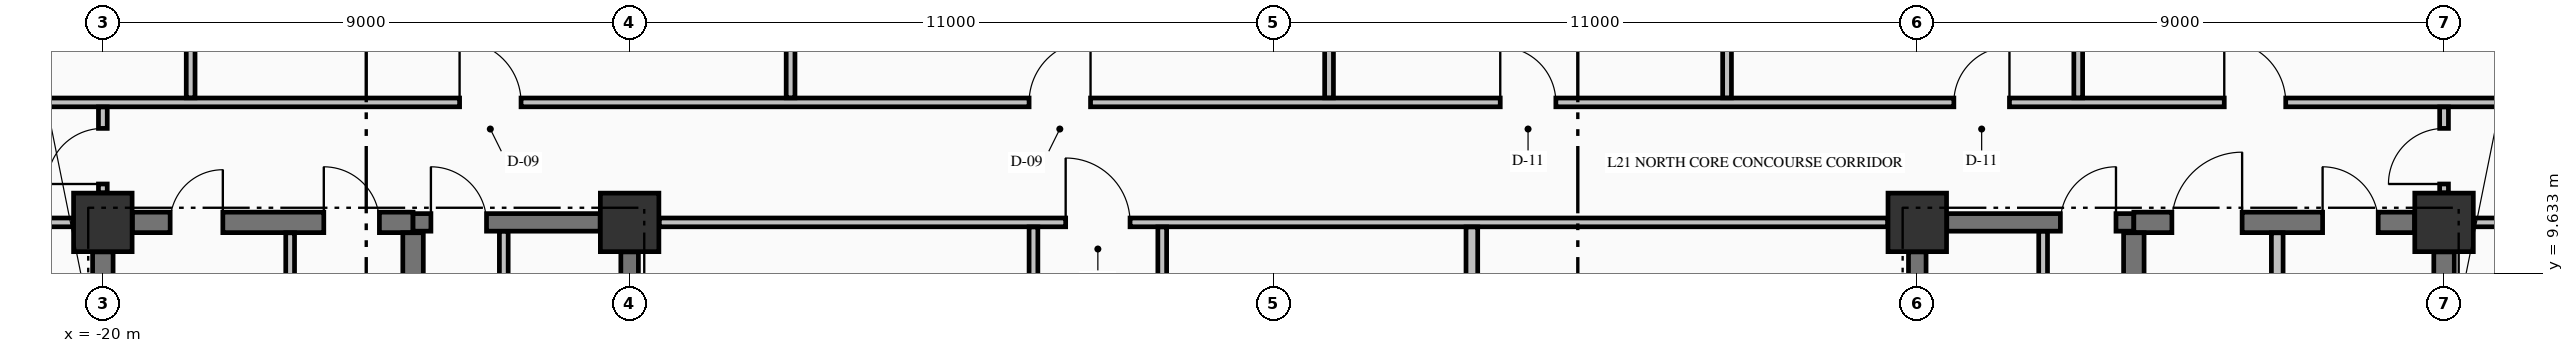
"""IFC4 building model, lengths in metres.
Left out: names, types, materials, properties, quantities, classifications, styles, units other than length and angle.
Written with IfcOpenShell. Run it as: python <this file> out.ifc"""

import sys

from ifc_helpers import new_model, si_unit, direction, frame, frame_2d, origin, origin_2d, place, context, subcontext, project, spatial, rectangle, extrude, element, fill, save


model = new_model("IFC4")
c1 = context("Model", 3, precision=1e-05, world=origin(), true_north=direction((0.0, 1.0)))
c2 = subcontext(c1, "Body", "Model", "MODEL_VIEW")
j1 = project(units=[si_unit("LENGTHUNIT", "METRE"), si_unit("PLANEANGLEUNIT", "RADIAN")], contexts=[c1])
p1 = place(None, origin())
s1 = spatial("IfcSite", under=j1, at=p1, CompositionType="ELEMENT")
p2 = place(p1, origin())
s2 = spatial("IfcBuilding", under=s1, at=p2, CompositionType="ELEMENT")
p3 = place(p2, frame((0.0, 0.0, 86.94)))
s3 = spatial("IfcBuildingStorey", under=s2, at=p3, CompositionType="ELEMENT", Elevation=86.94)
for number, where, z_axis, x_axis in (
    (1, (-20.0, 10.5, -0.425), (0.0, 0.0, 1.0), (1.0, 0.0, 0.0)),
    (2, (-11.0, 10.5, -0.425), (0.0, 0.0, 1.0), (1.0, 0.0, 0.0)),
    (3, (11.0, 10.5, -0.425), (0.0, 0.0, 1.0), (1.0, 0.0, 0.0)),
    (4, (20.0, 10.5, -0.425), (0.0, 0.0, 1.0), (1.0, 0.0, 0.0)),
):
    element("IfcColumn", number, at=place(p3, frame(where, z_axis=z_axis, x_axis=x_axis)), inside=s3, PredefinedType="COLUMN", context=c2, shape_type="SweptSolid", body=[
        extrude(rectangle(XDim=1.0, YDim=1.0, at=origin_2d()), origin(), (0.0, 0.0, 1.0), 4.595),
    ])
p4 = place(p3, frame((-19.496, 10.5, 0.0), z_axis=(0.0, 0.0, 1.0), x_axis=(1.0, 0.0, 0.0)))
e5 = element("IfcWall", 5, at=p4, inside=s3, PredefinedType="SHEAR", context=c2, shape_type="SweptSolid", body=[
    extrude(rectangle(XDim=4.796, YDim=0.35, at=frame_2d((2.398, 0.0))), origin(), (0.0, 0.0, 1.0), 4.17),
])
p5 = place(p4, frame((0.646, 0.0, 0.0)))
e6 = element("IfcOpeningElement", 6, at=p5, cuts=e5, PredefinedType="OPENING", context=c2, shape_type="SweptSolid", body=[
    extrude(rectangle(XDim=0.9, YDim=2.15, at=frame_2d((0.45, 1.075))), frame((0.0, 0.185, 0.0), z_axis=(0.0, -1.0, 0.0), x_axis=(1.0, 0.0, 0.0)), (0.0, 0.0, 1.0), 0.37),
])
p6 = place(p4, frame((3.271, 0.0, 0.0)))
e7 = element("IfcOpeningElement", 7, at=p6, cuts=e5, PredefinedType="OPENING", context=c2, shape_type="SweptSolid", body=[
    extrude(rectangle(XDim=0.95, YDim=2.15, at=frame_2d((0.475, 1.075))), frame((0.0, 0.185, 0.0), z_axis=(0.0, -1.0, 0.0), x_axis=(1.0, 0.0, 0.0)), (0.0, 0.0, 1.0), 0.37),
])
p7 = place(p3, frame((-14.7, 10.5, 0.0), z_axis=(0.0, 0.0, 1.0), x_axis=(1.0, 0.0, 0.0)))
e8 = element("IfcWall", 8, at=p7, inside=s3, PredefinedType="SHEAR", context=c2, shape_type="SweptSolid", body=[
    extrude(rectangle(XDim=3.196, YDim=0.3, at=frame_2d((1.598, 0.0))), origin(), (0.0, 0.0, 1.0), 4.17),
])
p8 = place(p7, frame((0.305, 0.0, 0.0)))
e9 = element("IfcOpeningElement", 9, at=p8, cuts=e8, PredefinedType="OPENING", context=c2, shape_type="SweptSolid", body=[
    extrude(rectangle(XDim=0.95, YDim=2.15, at=frame_2d((0.475, 1.075))), frame((0.0, 0.16, 0.0), z_axis=(0.0, -1.0, 0.0), x_axis=(1.0, 0.0, 0.0)), (0.0, 0.0, 1.0), 0.32),
])
p9 = place(p3, frame((11.504, 10.5, 0.0), z_axis=(0.0, 0.0, 1.0), x_axis=(1.0, 0.0, 0.0)))
e10 = element("IfcWall", 10, at=p9, inside=s3, PredefinedType="SHEAR", context=c2, shape_type="SweptSolid", body=[
    extrude(rectangle(XDim=3.196, YDim=0.3, at=frame_2d((1.598, 0.0))), origin(), (0.0, 0.0, 1.0), 4.17),
])
p10 = place(p9, frame((1.941, 0.0, 0.0)))
e11 = element("IfcOpeningElement", 11, at=p10, cuts=e10, PredefinedType="OPENING", context=c2, shape_type="SweptSolid", body=[
    extrude(rectangle(XDim=0.95, YDim=2.15, at=frame_2d((0.475, 1.075))), frame((0.0, 0.16, 0.0), z_axis=(0.0, -1.0, 0.0), x_axis=(1.0, 0.0, 0.0)), (0.0, 0.0, 1.0), 0.32),
])
p11 = place(p3, frame((14.7, 10.5, 0.0), z_axis=(0.0, 0.0, 1.0), x_axis=(1.0, 0.0, 0.0)))
e12 = element("IfcWall", 12, at=p11, inside=s3, PredefinedType="SHEAR", context=c2, shape_type="SweptSolid", body=[
    extrude(rectangle(XDim=4.796, YDim=0.35, at=frame_2d((2.398, 0.0))), origin(), (0.0, 0.0, 1.0), 4.17),
])
p12 = place(p11, frame((0.65, 0.0, 0.0)))
e13 = element("IfcOpeningElement", 13, at=p12, cuts=e12, PredefinedType="OPENING", context=c2, shape_type="SweptSolid", body=[
    extrude(rectangle(XDim=1.2, YDim=2.15, at=frame_2d((0.6, 1.075))), frame((0.0, 0.185, 0.0), z_axis=(0.0, -1.0, 0.0), x_axis=(1.0, 0.0, 0.0)), (0.0, 0.0, 1.0), 0.37),
])
p13 = place(p11, frame((3.225, 0.0, 0.0)))
e14 = element("IfcOpeningElement", 14, at=p13, cuts=e12, PredefinedType="OPENING", context=c2, shape_type="SweptSolid", body=[
    extrude(rectangle(XDim=0.95, YDim=2.15, at=frame_2d((0.475, 1.075))), frame((0.0, 0.185, 0.0), z_axis=(0.0, -1.0, 0.0), x_axis=(1.0, 0.0, 0.0)), (0.0, 0.0, 1.0), 0.37),
])
p14 = place(p3, frame((-22.835, 10.5, 0.0), z_axis=(0.0, 0.0, 1.0), x_axis=(1.0, 0.0, 0.0)))
e15 = element("IfcWall", 15, at=p14, inside=s3, PredefinedType="PARTITIONING", context=c2, shape_type="SweptSolid", body=[
    extrude(rectangle(XDim=2.329, YDim=0.15, at=frame_2d((1.165, 0.0))), origin(), (0.0, 0.0, 1.0), 4.17),
])
p15 = place(p14, frame((0.835, 0.0, 0.0)))
e16 = element("IfcOpeningElement", 16, at=p15, cuts=e15, PredefinedType="OPENING", context=c2, shape_type="SweptSolid", body=[
    extrude(rectangle(XDim=1.0, YDim=2.15, at=frame_2d((0.5, 1.075))), frame((0.0, 0.085, 0.0), z_axis=(0.0, -1.0, 0.0), x_axis=(1.0, 0.0, 0.0)), (0.0, 0.0, 1.0), 0.17),
])
p16 = place(p3, frame((-10.494, 10.5, 0.0), z_axis=(0.0, 0.0, 1.0), x_axis=(1.0, 0.0, 0.0)))
e17 = element("IfcWall", 17, at=p16, inside=s3, PredefinedType="PARTITIONING", context=c2, shape_type="SweptSolid", body=[
    extrude(rectangle(XDim=20.988, YDim=0.15, at=frame_2d((10.494, 0.0))), origin(), (0.0, 0.0, 1.0), 4.17),
])
p17 = place(p16, frame((6.944, 0.0, 0.0)))
e18 = element("IfcOpeningElement", 18, at=p17, cuts=e17, PredefinedType="OPENING", context=c2, shape_type="SweptSolid", body=[
    extrude(rectangle(XDim=1.1, YDim=2.15, at=frame_2d((0.55, 1.075))), frame((0.0, 0.085, 0.0), z_axis=(0.0, -1.0, 0.0), x_axis=(1.0, 0.0, 0.0)), (0.0, 0.0, 1.0), 0.17),
])
p18 = place(p3, frame((20.506, 10.5, 0.0), z_axis=(0.0, 0.0, 1.0), x_axis=(1.0, 0.0, 0.0)))
e19 = element("IfcWall", 19, at=p18, inside=s3, PredefinedType="PARTITIONING", context=c2, shape_type="SweptSolid", body=[
    extrude(rectangle(XDim=7.329, YDim=0.15, at=frame_2d((3.665, 0.0))), origin(), (0.0, 0.0, 1.0), 4.17),
])
p19 = place(p18, frame((3.019, 0.0, 0.0)))
e20 = element("IfcOpeningElement", 20, at=p19, cuts=e19, PredefinedType="OPENING", context=c2, shape_type="SweptSolid", body=[
    extrude(rectangle(XDim=0.95, YDim=2.15, at=frame_2d((0.475, 1.075))), frame((0.0, 0.085, 0.0), z_axis=(0.0, -1.0, 0.0), x_axis=(1.0, 0.0, 0.0)), (0.0, 0.0, 1.0), 0.17),
])
p20 = place(p3, frame((-22.835, 12.55, 0.0), z_axis=(0.0, 0.0, 1.0), x_axis=(1.0, 0.0, 0.0)))
e21 = element("IfcWall", 21, at=p20, inside=s3, PredefinedType="PARTITIONING", context=c2, shape_type="SweptSolid", body=[
    extrude(rectangle(XDim=50.67, YDim=0.15, at=frame_2d((25.335, 0.0))), origin(), (0.0, 0.0, 1.0), 4.17),
])
p21 = place(p20, frame((8.93, 0.0, 0.0)))
e22 = element("IfcOpeningElement", 22, at=p21, cuts=e21, PredefinedType="OPENING", context=c2, shape_type="SweptSolid", body=[
    extrude(rectangle(XDim=1.05, YDim=2.15, at=frame_2d((0.525, 1.075))), frame((0.0, 0.085, 0.0), z_axis=(0.0, -1.0, 0.0), x_axis=(1.0, 0.0, 0.0)), (0.0, 0.0, 1.0), 0.17),
])
p22 = place(p20, frame((18.66, 0.0, 0.0)))
e23 = element("IfcOpeningElement", 23, at=p22, cuts=e21, PredefinedType="OPENING", context=c2, shape_type="SweptSolid", body=[
    extrude(rectangle(XDim=1.05, YDim=2.15, at=frame_2d((0.525, 1.075))), frame((0.0, 0.085, 0.0), z_axis=(0.0, -1.0, 0.0), x_axis=(1.0, 0.0, 0.0)), (0.0, 0.0, 1.0), 0.17),
])
p23 = place(p20, frame((26.71, 0.0, 0.0)))
e24 = element("IfcOpeningElement", 24, at=p23, cuts=e21, PredefinedType="OPENING", context=c2, shape_type="SweptSolid", body=[
    extrude(rectangle(XDim=0.95, YDim=2.15, at=frame_2d((0.475, 1.075))), frame((0.0, 0.085, 0.0), z_axis=(0.0, -1.0, 0.0), x_axis=(1.0, 0.0, 0.0)), (0.0, 0.0, 1.0), 0.17),
])
p24 = place(p20, frame((34.46, 0.0, 0.0)))
e25 = element("IfcOpeningElement", 25, at=p24, cuts=e21, PredefinedType="OPENING", context=c2, shape_type="SweptSolid", body=[
    extrude(rectangle(XDim=0.95, YDim=2.15, at=frame_2d((0.475, 1.075))), frame((0.0, 0.085, 0.0), z_axis=(0.0, -1.0, 0.0), x_axis=(1.0, 0.0, 0.0)), (0.0, 0.0, 1.0), 0.17),
])
p25 = place(p20, frame((39.08, 0.0, 0.0)))
e26 = element("IfcOpeningElement", 26, at=p25, cuts=e21, PredefinedType="OPENING", context=c2, shape_type="SweptSolid", body=[
    extrude(rectangle(XDim=1.05, YDim=2.15, at=frame_2d((0.525, 1.075))), frame((0.0, 0.085, 0.0), z_axis=(0.0, -1.0, 0.0), x_axis=(1.0, 0.0, 0.0)), (0.0, 0.0, 1.0), 0.17),
])
p26 = place(p3, frame((-20.0, 0.504, 0.0), z_axis=(0.0, 0.0, 1.0), x_axis=(0.0, 1.0, 0.0)))
e27 = element("IfcWall", 27, at=p26, inside=s3, PredefinedType="SHEAR", context=c2, shape_type="SweptSolid", body=[
    extrude(rectangle(XDim=9.492, YDim=0.35, at=frame_2d((4.746, 0.0))), origin(), (0.0, 0.0, 1.0), 4.17),
])
p27 = place(p3, frame((-14.7, 5.852, 0.0), z_axis=(0.0, 0.0, 1.0), x_axis=(0.0, 1.0, 0.0)))
e28 = element("IfcWall", 28, at=p27, inside=s3, PredefinedType="SHEAR", context=c2, shape_type="SweptSolid", body=[
    extrude(rectangle(XDim=4.471, YDim=0.35, at=frame_2d((2.235, 0.0))), origin(), (0.0, 0.0, 1.0), 4.17),
])
for number, where, z_axis, x_axis in (
    (29, (-11.0, 5.852, 0.0), (0.0, 0.0, 1.0), (0.0, 1.0, 0.0)),
    (30, (11.0, 5.852, 0.0), (0.0, 0.0, 1.0), (0.0, 1.0, 0.0)),
):
    element("IfcWall", number, at=place(p3, frame(where, z_axis=z_axis, x_axis=x_axis)), inside=s3, PredefinedType="SHEAR", context=c2, shape_type="SweptSolid", body=[
        extrude(rectangle(XDim=4.144, YDim=0.3, at=frame_2d((2.072, 0.0))), origin(), (0.0, 0.0, 1.0), 4.17),
    ])
p28 = place(p3, frame((14.7, 5.852, 0.0), z_axis=(0.0, 0.0, 1.0), x_axis=(0.0, 1.0, 0.0)))
e31 = element("IfcWall", 31, at=p28, inside=s3, PredefinedType="SHEAR", context=c2, shape_type="SweptSolid", body=[
    extrude(rectangle(XDim=4.471, YDim=0.35, at=frame_2d((2.235, 0.0))), origin(), (0.0, 0.0, 1.0), 4.17),
])
p29 = place(p3, frame((20.0, 5.377, 0.0), z_axis=(0.0, 0.0, 1.0), x_axis=(0.0, 1.0, 0.0)))
e32 = element("IfcWall", 32, at=p29, inside=s3, PredefinedType="SHEAR", context=c2, shape_type="SweptSolid", body=[
    extrude(rectangle(XDim=4.619, YDim=0.35, at=frame_2d((2.31, 0.0))), origin(), (0.0, 0.0, 1.0), 4.17),
])
p30 = place(p3, frame((-20.0, 11.006, 0.0), z_axis=(0.0, 0.0, 1.0), x_axis=(0.0, 1.0, 0.0)))
e33 = element("IfcWall", 33, at=p30, inside=s3, PredefinedType="PARTITIONING", context=c2, shape_type="SweptSolid", body=[
    extrude(rectangle(XDim=1.466, YDim=0.15, at=frame_2d((0.733, 0.0))), origin(), (0.0, 0.0, 1.0), 3.36),
])
p31 = place(p30, frame((0.15, 0.0, 0.0)))
e34 = element("IfcOpeningElement", 34, at=p31, cuts=e33, PredefinedType="OPENING", context=c2, shape_type="SweptSolid", body=[
    extrude(rectangle(XDim=0.95, YDim=2.15, at=frame_2d((0.475, 1.075))), frame((0.0, 0.085, 0.0), z_axis=(0.0, -1.0, 0.0), x_axis=(1.0, 0.0, 0.0)), (0.0, 0.0, 1.0), 0.17),
])
p32 = place(p3, frame((-18.5, 12.628, 0.0), z_axis=(0.0, 0.0, 1.0), x_axis=(0.0, 1.0, 0.0)))
e35 = element("IfcWall", 35, at=p32, inside=s3, PredefinedType="PARTITIONING", context=c2, shape_type="SweptSolid", body=[
    extrude(rectangle(XDim=7.766, YDim=0.15, at=frame_2d((3.883, 0.0))), origin(), (0.0, 0.0, 1.0), 4.17),
])
p33 = place(p3, frame((-16.8, 4.878, 0.0), z_axis=(0.0, 0.0, 1.0), x_axis=(0.0, 1.0, 0.0)))
e36 = element("IfcWall", 36, at=p33, inside=s3, PredefinedType="PARTITIONING", context=c2, shape_type="SweptSolid", body=[
    extrude(rectangle(XDim=5.444, YDim=0.15, at=frame_2d((2.722, 0.0))), origin(), (0.0, 0.0, 1.0), 4.17),
])
p34 = place(p3, frame((-13.15, 7.228, 0.0), z_axis=(0.0, 0.0, 1.0), x_axis=(0.0, 1.0, 0.0)))
e37 = element("IfcWall", 37, at=p34, inside=s3, PredefinedType="PARTITIONING", context=c2, shape_type="SweptSolid", body=[
    extrude(rectangle(XDim=3.119, YDim=0.15, at=frame_2d((1.56, 0.0))), origin(), (0.0, 0.0, 1.0), 4.17),
])
p35 = place(p34, frame((1.097, 0.0, 0.0)))
e38 = element("IfcOpeningElement", 38, at=p35, cuts=e37, PredefinedType="OPENING", context=c2, shape_type="SweptSolid", body=[
    extrude(rectangle(XDim=0.95, YDim=2.15, at=frame_2d((0.475, 1.075))), frame((0.0, 0.085, 0.0), z_axis=(0.0, -1.0, 0.0), x_axis=(1.0, 0.0, 0.0)), (0.0, 0.0, 1.0), 0.17),
])
p36 = place(p3, frame((-8.25, 12.628, 0.0), z_axis=(0.0, 0.0, 1.0), x_axis=(0.0, 1.0, 0.0)))
e39 = element("IfcWall", 39, at=p36, inside=s3, PredefinedType="PARTITIONING", context=c2, shape_type="SweptSolid", body=[
    extrude(rectangle(XDim=12.707, YDim=0.15, at=frame_2d((6.354, 0.0))), origin(), (0.0, 0.0, 1.0), 4.17),
])
for number, where, z_axis, x_axis in (
    (40, (-4.1, 2.978, 0.0), (0.0, 0.0, 1.0), (0.0, 1.0, 0.0)),
    (41, (-1.9, 2.978, 0.0), (0.0, 0.0, 1.0), (0.0, 1.0, 0.0)),
):
    element("IfcWall", number, at=place(p3, frame(where, z_axis=z_axis, x_axis=x_axis)), inside=s3, PredefinedType="PARTITIONING", context=c2, shape_type="SweptSolid", body=[
        extrude(rectangle(XDim=7.444, YDim=0.15, at=frame_2d((3.722, 0.0))), origin(), (0.0, 0.0, 1.0), 4.17),
    ])
p37 = place(p3, frame((0.95, 12.628, 0.0), z_axis=(0.0, 0.0, 1.0), x_axis=(0.0, 1.0, 0.0)))
e42 = element("IfcWall", 42, at=p37, inside=s3, PredefinedType="PARTITIONING", context=c2, shape_type="SweptSolid", body=[
    extrude(rectangle(XDim=12.812, YDim=0.15, at=frame_2d((6.406, 0.0))), origin(), (0.0, 0.0, 1.0), 4.17),
])
p38 = place(p3, frame((3.39, 2.978, 0.0), z_axis=(0.0, 0.0, 1.0), x_axis=(0.0, 1.0, 0.0)))
e43 = element("IfcWall", 43, at=p38, inside=s3, PredefinedType="PARTITIONING", context=c2, shape_type="SweptSolid", body=[
    extrude(rectangle(XDim=7.444, YDim=0.2, at=frame_2d((3.722, 0.0))), origin(), (0.0, 0.0, 1.0), 4.17),
])
p39 = place(p3, frame((7.75, 12.628, 0.0), z_axis=(0.0, 0.0, 1.0), x_axis=(0.0, 1.0, 0.0)))
e44 = element("IfcWall", 44, at=p39, inside=s3, PredefinedType="PARTITIONING", context=c2, shape_type="SweptSolid", body=[
    extrude(rectangle(XDim=12.812, YDim=0.15, at=frame_2d((6.406, 0.0))), origin(), (0.0, 0.0, 1.0), 4.17),
])
p40 = place(p3, frame((13.15, 7.228, 0.0), z_axis=(0.0, 0.0, 1.0), x_axis=(0.0, 1.0, 0.0)))
e45 = element("IfcWall", 45, at=p40, inside=s3, PredefinedType="PARTITIONING", context=c2, shape_type="SweptSolid", body=[
    extrude(rectangle(XDim=3.119, YDim=0.15, at=frame_2d((1.56, 0.0))), origin(), (0.0, 0.0, 1.0), 4.17),
])
p41 = place(p40, frame((1.097, 0.0, 0.0)))
e46 = element("IfcOpeningElement", 46, at=p41, cuts=e45, PredefinedType="OPENING", context=c2, shape_type="SweptSolid", body=[
    extrude(rectangle(XDim=0.95, YDim=2.15, at=frame_2d((0.475, 1.075))), frame((0.0, 0.085, 0.0), z_axis=(0.0, -1.0, 0.0), x_axis=(1.0, 0.0, 0.0)), (0.0, 0.0, 1.0), 0.17),
])
p42 = place(p3, frame((13.75, 12.628, 0.0), z_axis=(0.0, 0.0, 1.0), x_axis=(0.0, 1.0, 0.0)))
e47 = element("IfcWall", 47, at=p42, inside=s3, PredefinedType="PARTITIONING", context=c2, shape_type="SweptSolid", body=[
    extrude(rectangle(XDim=12.707, YDim=0.15, at=frame_2d((6.354, 0.0))), origin(), (0.0, 0.0, 1.0), 4.17),
])
p43 = place(p3, frame((17.15, 7.928, 0.0), z_axis=(0.0, 0.0, 1.0), x_axis=(0.0, 1.0, 0.0)))
e48 = element("IfcWall", 48, at=p43, inside=s3, PredefinedType="PARTITIONING", context=c2, shape_type="SweptSolid", body=[
    extrude(rectangle(XDim=2.394, YDim=0.2, at=frame_2d((1.197, 0.0))), origin(), (0.0, 0.0, 1.0), 4.17),
])
p44 = place(p3, frame((20.0, 11.006, 0.0), z_axis=(0.0, 0.0, 1.0), x_axis=(0.0, 1.0, 0.0)))
e49 = element("IfcWall", 49, at=p44, inside=s3, PredefinedType="PARTITIONING", context=c2, shape_type="SweptSolid", body=[
    extrude(rectangle(XDim=1.466, YDim=0.15, at=frame_2d((0.733, 0.0))), origin(), (0.0, 0.0, 1.0), 3.36),
])
p45 = place(p44, frame((0.15, 0.0, 0.0)))
e50 = element("IfcOpeningElement", 50, at=p45, cuts=e49, PredefinedType="OPENING", context=c2, shape_type="SweptSolid", body=[
    extrude(rectangle(XDim=0.95, YDim=2.15, at=frame_2d((0.475, 1.075))), frame((0.0, 0.085, 0.0), z_axis=(0.0, -1.0, 0.0), x_axis=(1.0, 0.0, 0.0)), (0.0, 0.0, 1.0), 0.17),
])
p46 = place(p8, origin())
e51 = element("IfcDoor", 51, at=p46, inside=s3, OperationType="SINGLE_SWING_LEFT", PredefinedType="DOOR", context=c2, shape_type="SweptSolid", body=[
    extrude(rectangle(XDim=0.95, YDim=2.15, at=frame_2d((0.475, 1.075))), frame((0.0, 0.025, 0.0), z_axis=(0.0, -1.0, 0.0), x_axis=(1.0, 0.0, 0.0)), (0.0, 0.0, 1.0), 0.05),
])
fill(e9, e51)
p47 = place(p10, origin())
e52 = element("IfcDoor", 52, at=p47, inside=s3, OperationType="SINGLE_SWING_RIGHT", PredefinedType="DOOR", context=c2, shape_type="SweptSolid", body=[
    extrude(rectangle(XDim=0.95, YDim=2.15, at=frame_2d((0.475, 1.075))), frame((0.0, 0.025, 0.0), z_axis=(0.0, -1.0, 0.0), x_axis=(1.0, 0.0, 0.0)), (0.0, 0.0, 1.0), 0.05),
])
fill(e11, e52)
p48 = place(p5, origin())
e53 = element("IfcDoor", 53, at=p48, inside=s3, OperationType="SINGLE_SWING_RIGHT", PredefinedType="DOOR", context=c2, shape_type="SweptSolid", body=[
    extrude(rectangle(XDim=0.9, YDim=2.15, at=frame_2d((0.45, 1.075))), frame((0.0, 0.025, 0.0), z_axis=(0.0, -1.0, 0.0), x_axis=(1.0, 0.0, 0.0)), (0.0, 0.0, 1.0), 0.05),
])
fill(e6, e53)
p49 = place(p6, origin())
e54 = element("IfcDoor", 54, at=p49, inside=s3, OperationType="SINGLE_SWING_LEFT", PredefinedType="DOOR", context=c2, shape_type="SweptSolid", body=[
    extrude(rectangle(XDim=0.95, YDim=2.15, at=frame_2d((0.475, 1.075))), frame((0.0, 0.025, 0.0), z_axis=(0.0, -1.0, 0.0), x_axis=(1.0, 0.0, 0.0)), (0.0, 0.0, 1.0), 0.05),
])
fill(e7, e54)
p50 = place(p12, origin())
e55 = element("IfcDoor", 55, at=p50, inside=s3, OperationType="SINGLE_SWING_RIGHT", PredefinedType="DOOR", context=c2, shape_type="SweptSolid", body=[
    extrude(rectangle(XDim=1.2, YDim=2.15, at=frame_2d((0.6, 1.075))), frame((0.0, 0.025, 0.0), z_axis=(0.0, -1.0, 0.0), x_axis=(1.0, 0.0, 0.0)), (0.0, 0.0, 1.0), 0.05),
])
fill(e13, e55)
p51 = place(p13, origin())
e56 = element("IfcDoor", 56, at=p51, inside=s3, OperationType="SINGLE_SWING_LEFT", PredefinedType="DOOR", context=c2, shape_type="SweptSolid", body=[
    extrude(rectangle(XDim=0.95, YDim=2.15, at=frame_2d((0.475, 1.075))), frame((0.0, 0.025, 0.0), z_axis=(0.0, -1.0, 0.0), x_axis=(1.0, 0.0, 0.0)), (0.0, 0.0, 1.0), 0.05),
])
fill(e14, e56)
p52 = place(p17, origin())
e57 = element("IfcDoor", 57, at=p52, inside=s3, OperationType="SINGLE_SWING_LEFT", PredefinedType="DOOR", context=c2, shape_type="SweptSolid", body=[
    extrude(rectangle(XDim=1.1, YDim=2.15, at=frame_2d((0.55, 1.075))), frame((0.0, 0.025, 0.0), z_axis=(0.0, -1.0, 0.0), x_axis=(1.0, 0.0, 0.0)), (0.0, 0.0, 1.0), 0.05),
])
fill(e18, e57)
p53 = place(p21, origin())
e58 = element("IfcDoor", 58, at=p53, inside=s3, OperationType="SINGLE_SWING_LEFT", PredefinedType="DOOR", context=c2, shape_type="SweptSolid", body=[
    extrude(rectangle(XDim=1.05, YDim=2.15, at=frame_2d((0.525, 1.075))), frame((0.0, 0.025, 0.0), z_axis=(0.0, -1.0, 0.0), x_axis=(1.0, 0.0, 0.0)), (0.0, 0.0, 1.0), 0.05),
])
fill(e22, e58)
p54 = place(p22, origin())
e59 = element("IfcDoor", 59, at=p54, inside=s3, OperationType="SINGLE_SWING_RIGHT", PredefinedType="DOOR", context=c2, shape_type="SweptSolid", body=[
    extrude(rectangle(XDim=1.05, YDim=2.15, at=frame_2d((0.525, 1.075))), frame((0.0, 0.025, 0.0), z_axis=(0.0, -1.0, 0.0), x_axis=(1.0, 0.0, 0.0)), (0.0, 0.0, 1.0), 0.05),
])
fill(e23, e59)
p55 = place(p23, origin())
e60 = element("IfcDoor", 60, at=p55, inside=s3, OperationType="SINGLE_SWING_LEFT", PredefinedType="DOOR", context=c2, shape_type="SweptSolid", body=[
    extrude(rectangle(XDim=0.95, YDim=2.15, at=frame_2d((0.475, 1.075))), frame((0.0, 0.025, 0.0), z_axis=(0.0, -1.0, 0.0), x_axis=(1.0, 0.0, 0.0)), (0.0, 0.0, 1.0), 0.05),
])
fill(e24, e60)
p56 = place(p24, origin())
e61 = element("IfcDoor", 61, at=p56, inside=s3, OperationType="SINGLE_SWING_RIGHT", PredefinedType="DOOR", context=c2, shape_type="SweptSolid", body=[
    extrude(rectangle(XDim=0.95, YDim=2.15, at=frame_2d((0.475, 1.075))), frame((0.0, 0.025, 0.0), z_axis=(0.0, -1.0, 0.0), x_axis=(1.0, 0.0, 0.0)), (0.0, 0.0, 1.0), 0.05),
])
fill(e25, e61)
p57 = place(p25, origin())
e62 = element("IfcDoor", 62, at=p57, inside=s3, OperationType="SINGLE_SWING_LEFT", PredefinedType="DOOR", context=c2, shape_type="SweptSolid", body=[
    extrude(rectangle(XDim=1.05, YDim=2.15, at=frame_2d((0.525, 1.075))), frame((0.0, 0.025, 0.0), z_axis=(0.0, -1.0, 0.0), x_axis=(1.0, 0.0, 0.0)), (0.0, 0.0, 1.0), 0.05),
])
fill(e26, e62)
p58 = place(p31, origin())
e63 = element("IfcDoor", 63, at=p58, inside=s3, OperationType="SINGLE_SWING_LEFT", PredefinedType="DOOR", context=c2, shape_type="SweptSolid", body=[
    extrude(rectangle(XDim=0.95, YDim=2.15, at=frame_2d((0.475, 1.075))), frame((0.0, 0.025, 0.0), z_axis=(0.0, -1.0, 0.0), x_axis=(1.0, 0.0, 0.0)), (0.0, 0.0, 1.0), 0.05),
])
fill(e34, e63)
p59 = place(p45, origin())
e64 = element("IfcDoor", 64, at=p59, inside=s3, OperationType="SINGLE_SWING_LEFT", PredefinedType="DOOR", context=c2, shape_type="SweptSolid", body=[
    extrude(rectangle(XDim=0.95, YDim=2.15, at=frame_2d((0.475, 1.075))), frame((0.0, 0.025, 0.0), z_axis=(0.0, -1.0, 0.0), x_axis=(1.0, 0.0, 0.0)), (0.0, 0.0, 1.0), 0.05),
])
fill(e50, e64)
save(model, sys.argv[1])
